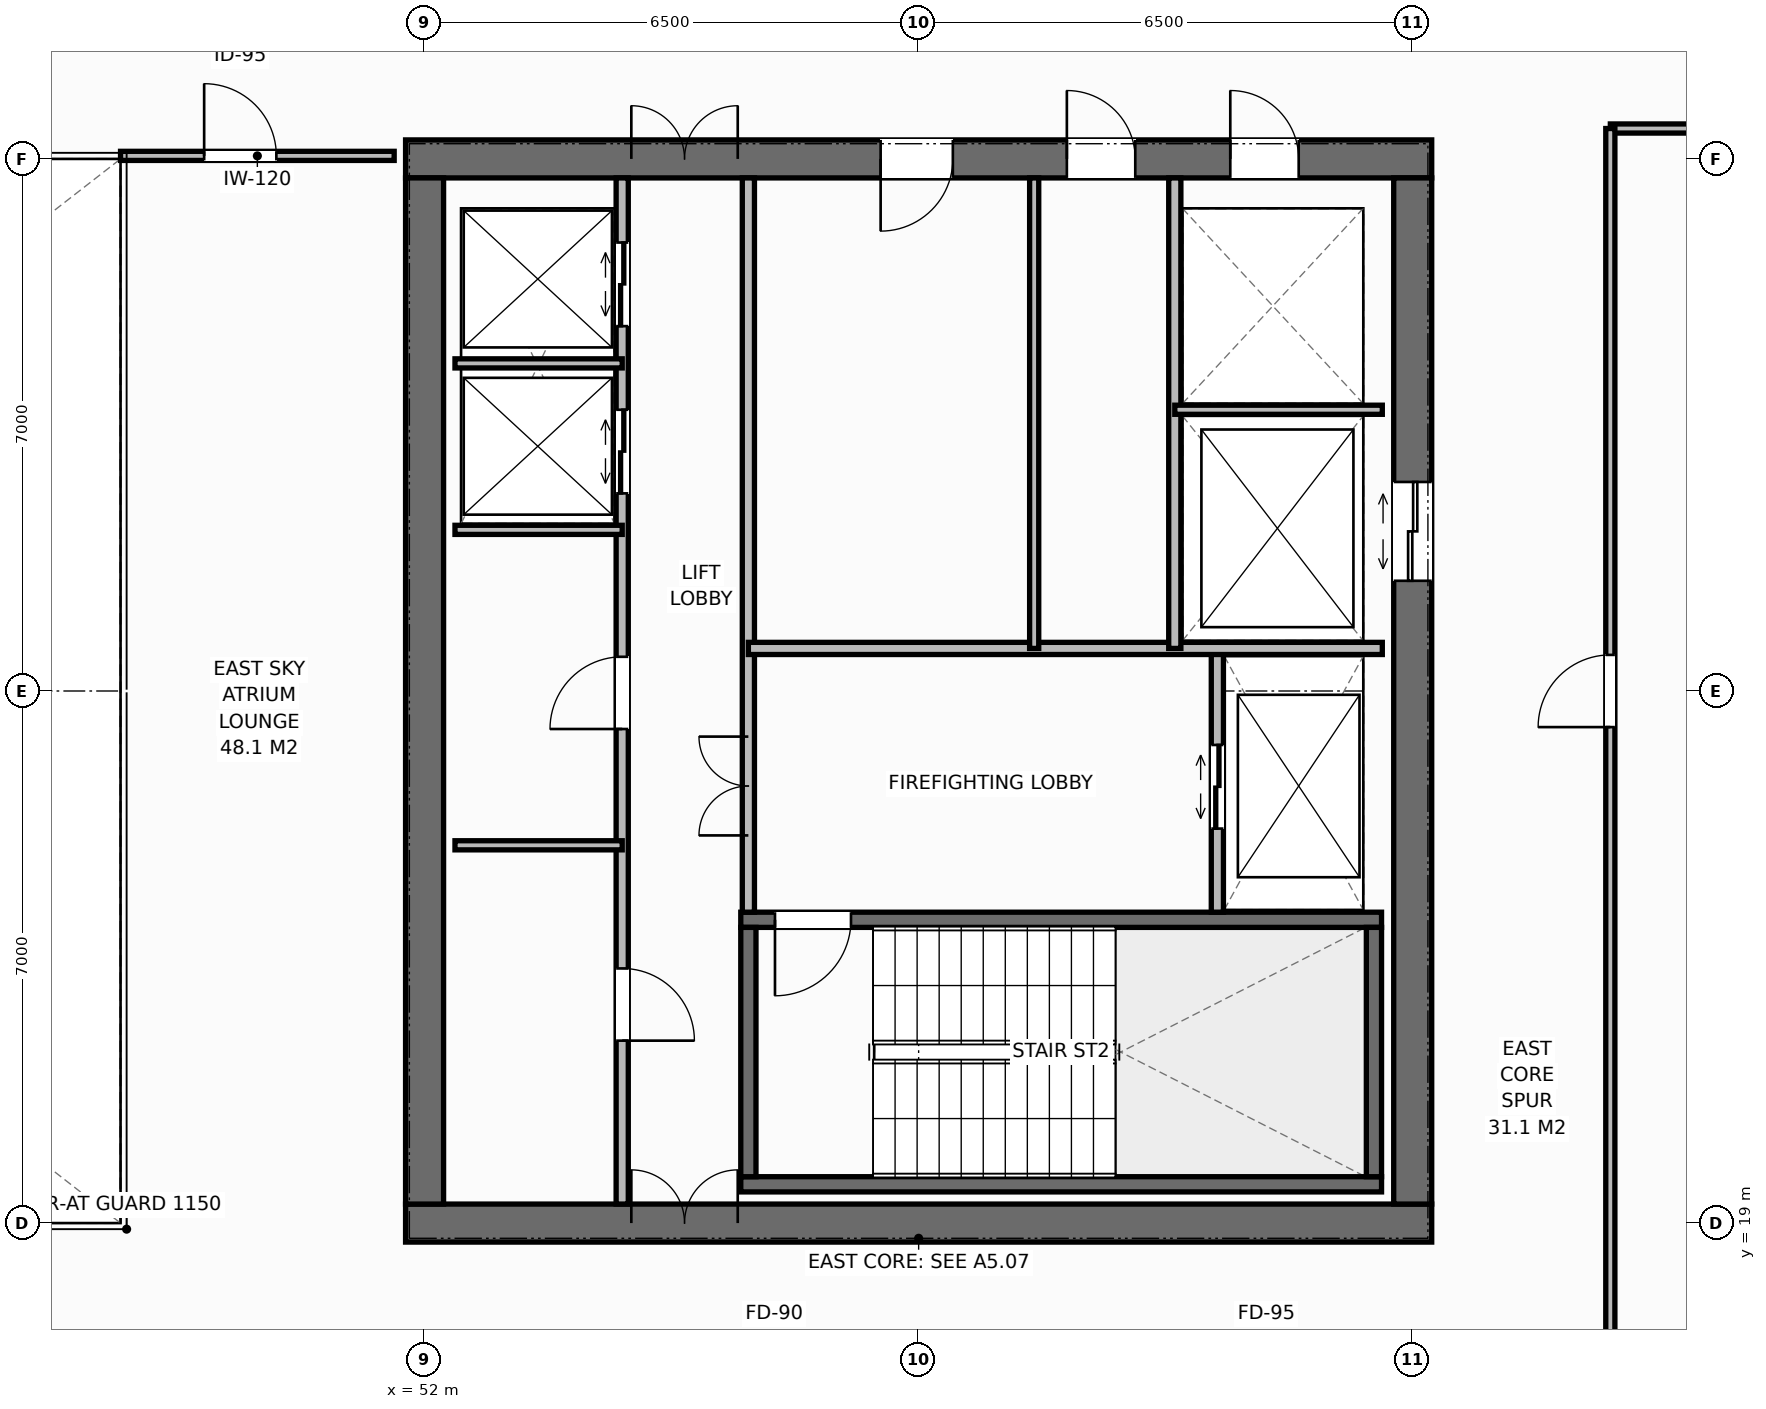
"""IFC4 building model, lengths in metres.
Left out: names, types, materials, properties, quantities, classifications, styles, units other than length and angle.
Written with IfcOpenShell. Run it as: python <this file> out.ifc"""

import sys

from ifc_helpers import new_model, si_unit, direction, frame, frame_2d, origin, place, context, subcontext, project, spatial, rectangle, extrude, element, fill, save


model = new_model("IFC4")
c1 = context("Model", 3, precision=1e-05, world=origin(), true_north=direction((0.0, 1.0)))
c2 = subcontext(c1, "Body", "Model", "MODEL_VIEW")
j1 = project(units=[si_unit("LENGTHUNIT", "METRE"), si_unit("PLANEANGLEUNIT", "RADIAN")], contexts=[c1])
p1 = place(None, origin())
s1 = spatial("IfcSite", under=j1, at=p1, CompositionType="ELEMENT")
p2 = place(p1, origin())
s2 = spatial("IfcBuilding", under=s1, at=p2, CompositionType="ELEMENT")
p3 = place(p2, frame((0.0, 0.0, 290.4)))
s3 = spatial("IfcBuildingStorey", under=s2, at=p3, CompositionType="ELEMENT", Elevation=290.4)
p4 = place(p3, frame((51.75, 19.0, 0.0), z_axis=(0.0, 0.0, 1.0), x_axis=(1.0, 0.0, 0.0)))
e1 = element("IfcWall", 1, at=p4, inside=s3, PredefinedType="SHEAR", context=c2, shape_type="SweptSolid", body=[
    extrude(rectangle(XDim=13.5, YDim=0.5, at=frame_2d((6.75, 0.0))), origin(), (0.0, 0.0, 1.0), 4.0),
])
p5 = place(p4, frame((2.97, 0.0, 0.0)))
e2 = element("IfcOpeningElement", 2, at=p5, cuts=e1, PredefinedType="OPENING", context=c2, shape_type="SweptSolid", body=[
    extrude(rectangle(XDim=1.4, YDim=2.2, at=frame_2d((0.7, 1.1))), frame((0.0, 0.26, 0.0), z_axis=(0.0, -1.0, 0.0), x_axis=(1.0, 0.0, 0.0)), (0.0, 0.0, 1.0), 0.52),
])
p6 = place(p3, frame((51.75, 33.0, 0.0), z_axis=(0.0, 0.0, 1.0), x_axis=(1.0, 0.0, 0.0)))
e3 = element("IfcWall", 3, at=p6, inside=s3, PredefinedType="SHEAR", context=c2, shape_type="SweptSolid", body=[
    extrude(rectangle(XDim=13.5, YDim=0.5, at=frame_2d((6.75, 0.0))), origin(), (0.0, 0.0, 1.0), 4.0),
])
p7 = place(p6, frame((2.97, 0.0, 0.0)))
e4 = element("IfcOpeningElement", 4, at=p7, cuts=e3, PredefinedType="OPENING", context=c2, shape_type="SweptSolid", body=[
    extrude(rectangle(XDim=1.4, YDim=2.2, at=frame_2d((0.7, 1.1))), frame((0.0, 0.26, 0.0), z_axis=(0.0, -1.0, 0.0), x_axis=(1.0, 0.0, 0.0)), (0.0, 0.0, 1.0), 0.52),
])
p8 = place(p6, frame((10.85, 0.0, 0.0)))
e5 = element("IfcOpeningElement", 5, at=p8, cuts=e3, PredefinedType="OPENING", context=c2, shape_type="SweptSolid", body=[
    extrude(rectangle(XDim=0.9, YDim=2.15, at=frame_2d((0.45, 1.075))), frame((0.0, 0.26, 0.0), z_axis=(0.0, -1.0, 0.0), x_axis=(1.0, 0.0, 0.0)), (0.0, 0.0, 1.0), 0.52),
])
p9 = place(p6, frame((6.25, 0.0, 0.0)))
e6 = element("IfcOpeningElement", 6, at=p9, cuts=e3, PredefinedType="OPENING", context=c2, shape_type="SweptSolid", body=[
    extrude(rectangle(XDim=0.95, YDim=2.15, at=frame_2d((0.475, 1.075))), frame((0.0, 0.26, 0.0), z_axis=(0.0, -1.0, 0.0), x_axis=(1.0, 0.0, 0.0)), (0.0, 0.0, 1.0), 0.52),
])
p10 = place(p6, frame((8.7, 0.0, 0.0)))
e7 = element("IfcOpeningElement", 7, at=p10, cuts=e3, PredefinedType="OPENING", context=c2, shape_type="SweptSolid", body=[
    extrude(rectangle(XDim=0.9, YDim=2.15, at=frame_2d((0.45, 1.075))), frame((0.0, 0.26, 0.0), z_axis=(0.0, -1.0, 0.0), x_axis=(1.0, 0.0, 0.0)), (0.0, 0.0, 1.0), 0.52),
])
p11 = place(p3, frame((52.0, 19.25, 0.0), z_axis=(0.0, 0.0, 1.0), x_axis=(0.0, 1.0, 0.0)))
e8 = element("IfcWall", 8, at=p11, inside=s3, PredefinedType="SHEAR", context=c2, shape_type="SweptSolid", body=[
    extrude(rectangle(XDim=13.5, YDim=0.5, at=frame_2d((6.75, 0.0))), origin(), (0.0, 0.0, 1.0), 4.0),
])
p12 = place(p3, frame((65.0, 19.25, 0.0), z_axis=(0.0, 0.0, 1.0), x_axis=(0.0, 1.0, 0.0)))
e9 = element("IfcWall", 9, at=p12, inside=s3, PredefinedType="SHEAR", context=c2, shape_type="SweptSolid", body=[
    extrude(rectangle(XDim=13.5, YDim=0.5, at=frame_2d((6.75, 0.0))), origin(), (0.0, 0.0, 1.0), 4.0),
])
p13 = place(p12, frame((8.2, 0.0, 0.0)))
e10 = element("IfcOpeningElement", 10, at=p13, cuts=e9, PredefinedType="OPENING", context=c2, shape_type="SweptSolid", body=[
    extrude(rectangle(XDim=1.3, YDim=2.2, at=frame_2d((0.65, 1.1))), frame((0.0, 0.26, 0.0), z_axis=(0.0, -1.0, 0.0), x_axis=(1.0, 0.0, 0.0)), (0.0, 0.0, 1.0), 0.52),
])
p14 = place(p3, frame((56.16, 19.51, 0.0), z_axis=(0.0, 0.0, 1.0), x_axis=(1.0, 0.0, 0.0)))
e11 = element("IfcWall", 11, at=p14, inside=s3, PredefinedType="SHEAR", context=c2, shape_type="SweptSolid", body=[
    extrude(rectangle(XDim=8.43, YDim=0.2, at=frame_2d((4.215, 0.0))), origin(), (0.0, 0.0, 1.0), 4.0),
])
p15 = place(p3, frame((56.16, 22.99, 0.0), z_axis=(0.0, 0.0, 1.0), x_axis=(1.0, 0.0, 0.0)))
e12 = element("IfcWall", 12, at=p15, inside=s3, PredefinedType="SHEAR", context=c2, shape_type="SweptSolid", body=[
    extrude(rectangle(XDim=8.43, YDim=0.2, at=frame_2d((4.215, 0.0))), origin(), (0.0, 0.0, 1.0), 4.0),
])
p16 = place(p15, frame((0.45, 0.0, 0.0)))
e13 = element("IfcOpeningElement", 13, at=p16, cuts=e12, PredefinedType="OPENING", context=c2, shape_type="SweptSolid", body=[
    extrude(rectangle(XDim=1.0, YDim=2.15, at=frame_2d((0.5, 1.075))), frame((0.0, 0.11, 0.0), z_axis=(0.0, -1.0, 0.0), x_axis=(1.0, 0.0, 0.0)), (0.0, 0.0, 1.0), 0.22),
])
for number, where, z_axis, x_axis in (
    (14, (56.26, 19.61, 0.0), (0.0, 0.0, 1.0), (0.0, 1.0, 0.0)),
    (15, (64.49, 19.61, 0.0), (0.0, 0.0, 1.0), (0.0, 1.0, 0.0)),
):
    element("IfcWall", number, at=place(p3, frame(where, z_axis=z_axis, x_axis=x_axis)), inside=s3, PredefinedType="SHEAR", context=c2, shape_type="SweptSolid", body=[
        extrude(rectangle(XDim=3.28, YDim=0.2, at=frame_2d((1.64, 0.0))), origin(), (0.0, 0.0, 1.0), 4.0),
    ])
p17 = place(p3, frame((54.6, 19.25, 0.0), z_axis=(0.0, 0.0, 1.0), x_axis=(0.0, 1.0, 0.0)))
e16 = element("IfcWall", 16, at=p17, inside=s3, PredefinedType="STANDARD", context=c2, shape_type="SweptSolid", body=[
    extrude(rectangle(XDim=13.5, YDim=0.16, at=frame_2d((6.75, 0.0))), origin(), (0.0, 0.0, 1.0), 3.788),
])
p18 = place(p17, frame((2.15, 0.0, 0.0)))
e17 = element("IfcOpeningElement", 17, at=p18, cuts=e16, PredefinedType="OPENING", context=c2, shape_type="SweptSolid", body=[
    extrude(rectangle(XDim=0.95, YDim=2.15, at=frame_2d((0.475, 1.075))), frame((0.0, 0.09, 0.0), z_axis=(0.0, -1.0, 0.0), x_axis=(1.0, 0.0, 0.0)), (0.0, 0.0, 1.0), 0.18),
])
p19 = place(p17, frame((6.25, 0.0, 0.0)))
e18 = element("IfcOpeningElement", 18, at=p19, cuts=e16, PredefinedType="OPENING", context=c2, shape_type="SweptSolid", body=[
    extrude(rectangle(XDim=0.95, YDim=2.15, at=frame_2d((0.475, 1.075))), frame((0.0, 0.09, 0.0), z_axis=(0.0, -1.0, 0.0), x_axis=(1.0, 0.0, 0.0)), (0.0, 0.0, 1.0), 0.18),
])
p20 = place(p17, frame((9.35, 0.0, 0.0)))
e19 = element("IfcOpeningElement", 19, at=p20, cuts=e16, PredefinedType="OPENING", context=c2, shape_type="SweptSolid", body=[
    extrude(rectangle(XDim=1.1, YDim=2.2, at=frame_2d((0.55, 1.1))), frame((0.0, 0.09, 0.0), z_axis=(0.0, -1.0, 0.0), x_axis=(1.0, 0.0, 0.0)), (0.0, 0.0, 1.0), 0.18),
])
p21 = place(p17, frame((11.55, 0.0, 0.0)))
e20 = element("IfcOpeningElement", 20, at=p21, cuts=e16, PredefinedType="OPENING", context=c2, shape_type="SweptSolid", body=[
    extrude(rectangle(XDim=1.1, YDim=2.2, at=frame_2d((0.55, 1.1))), frame((0.0, 0.09, 0.0), z_axis=(0.0, -1.0, 0.0), x_axis=(1.0, 0.0, 0.0)), (0.0, 0.0, 1.0), 0.18),
])
p22 = place(p3, frame((56.26, 23.09, 0.0), z_axis=(0.0, 0.0, 1.0), x_axis=(0.0, 1.0, 0.0)))
e21 = element("IfcWall", 21, at=p22, inside=s3, PredefinedType="STANDARD", context=c2, shape_type="SweptSolid", body=[
    extrude(rectangle(XDim=9.66, YDim=0.16, at=frame_2d((4.83, 0.0))), origin(), (0.0, 0.0, 1.0), 3.788),
])
p23 = place(p22, frame((1.01, 0.0, 0.0)))
e22 = element("IfcOpeningElement", 22, at=p23, cuts=e21, PredefinedType="OPENING", context=c2, shape_type="SweptSolid", body=[
    extrude(rectangle(XDim=1.3, YDim=2.2, at=frame_2d((0.65, 1.1))), frame((0.0, 0.09, 0.0), z_axis=(0.0, -1.0, 0.0), x_axis=(1.0, 0.0, 0.0)), (0.0, 0.0, 1.0), 0.18),
])
for number, where, z_axis, x_axis in (
    (23, (52.4, 23.97, 0.0), (0.0, 0.0, 1.0), (1.0, 0.0, 0.0)),
    (24, (52.4, 28.12, 0.0), (0.0, 0.0, 1.0), (1.0, 0.0, 0.0)),
    (25, (52.4, 30.31, 0.0), (0.0, 0.0, 1.0), (1.0, 0.0, 0.0)),
):
    element("IfcWall", number, at=place(p3, frame(where, z_axis=z_axis, x_axis=x_axis)), inside=s3, PredefinedType="PARTITIONING", context=c2, shape_type="SweptSolid", body=[
        extrude(rectangle(XDim=2.2, YDim=0.12, at=frame_2d((1.1, 0.0))), origin(), (0.0, 0.0, 1.0), 3.788),
    ])
p24 = place(p3, frame((62.43, 23.09, 0.0), z_axis=(0.0, 0.0, 1.0), x_axis=(0.0, 1.0, 0.0)))
e26 = element("IfcWall", 26, at=p24, inside=s3, PredefinedType="STANDARD", context=c2, shape_type="SweptSolid", body=[
    extrude(rectangle(XDim=3.47, YDim=0.16, at=frame_2d((1.735, 0.0))), origin(), (0.0, 0.0, 1.0), 3.788),
])
p25 = place(p24, frame((1.1, 0.0, 0.0)))
e27 = element("IfcOpeningElement", 27, at=p25, cuts=e26, PredefinedType="OPENING", context=c2, shape_type="SweptSolid", body=[
    extrude(rectangle(XDim=1.1, YDim=2.2, at=frame_2d((0.55, 1.1))), frame((0.0, 0.09, 0.0), z_axis=(0.0, -1.0, 0.0), x_axis=(1.0, 0.0, 0.0)), (0.0, 0.0, 1.0), 0.18),
])
p26 = place(p3, frame((56.26, 26.56, 0.0), z_axis=(0.0, 0.0, 1.0), x_axis=(1.0, 0.0, 0.0)))
e28 = element("IfcWall", 28, at=p26, inside=s3, PredefinedType="STANDARD", context=c2, shape_type="SweptSolid", body=[
    extrude(rectangle(XDim=8.34, YDim=0.16, at=frame_2d((4.17, 0.0))), origin(), (0.0, 0.0, 1.0), 3.788),
])
p27 = place(p3, frame((61.87, 26.56, 0.0), z_axis=(0.0, 0.0, 1.0), x_axis=(0.0, 1.0, 0.0)))
e29 = element("IfcWall", 29, at=p27, inside=s3, PredefinedType="STANDARD", context=c2, shape_type="SweptSolid", body=[
    extrude(rectangle(XDim=6.19, YDim=0.16, at=frame_2d((3.095, 0.0))), origin(), (0.0, 0.0, 1.0), 3.788),
])
p28 = place(p3, frame((61.87, 29.7, 0.0), z_axis=(0.0, 0.0, 1.0), x_axis=(1.0, 0.0, 0.0)))
e30 = element("IfcWall", 30, at=p28, inside=s3, PredefinedType="PARTITIONING", context=c2, shape_type="SweptSolid", body=[
    extrude(rectangle(XDim=2.73, YDim=0.12, at=frame_2d((1.365, 0.0))), origin(), (0.0, 0.0, 1.0), 3.788),
])
p29 = place(p3, frame((60.02, 26.56, 0.0), z_axis=(0.0, 0.0, 1.0), x_axis=(0.0, 1.0, 0.0)))
e31 = element("IfcWall", 31, at=p29, inside=s3, PredefinedType="PARTITIONING", context=c2, shape_type="SweptSolid", body=[
    extrude(rectangle(XDim=6.19, YDim=0.12, at=frame_2d((3.095, 0.0))), origin(), (0.0, 0.0, 1.0), 3.788),
])
p30 = place(p3, frame((48.0, 33.04, 0.0), z_axis=(0.0, 0.0, 1.0), x_axis=(1.0, 0.0, 0.0)))
e32 = element("IfcWall", 32, at=p30, inside=s3, PredefinedType="PARTITIONING", context=c2, shape_type="SweptSolid", body=[
    extrude(rectangle(XDim=3.6, YDim=0.12, at=frame_2d((1.8, 0.0))), origin(), (0.0, 0.0, 1.0), 3.528),
])
p31 = place(p30, frame((1.1, 0.0, 0.0)))
e33 = element("IfcOpeningElement", 33, at=p31, cuts=e32, PredefinedType="OPENING", context=c2, shape_type="SweptSolid", body=[
    extrude(rectangle(XDim=0.95, YDim=2.15, at=frame_2d((0.475, 1.075))), frame((0.0, 0.07, 0.0), z_axis=(0.0, -1.0, 0.0), x_axis=(1.0, 0.0, 0.0)), (0.0, 0.0, 1.0), 0.14),
])
p32 = place(p3, frame((67.6, 33.4, 0.0), z_axis=(0.0, 0.0, 1.0), x_axis=(1.0, 0.0, 0.0)))
e34 = element("IfcWall", 34, at=p32, inside=s3, PredefinedType="PARTITIONING", context=c2, shape_type="SweptSolid", body=[
    extrude(rectangle(XDim=5.767, YDim=0.12, at=frame_2d((2.884, 0.0))), origin(), (0.0, 0.0, 1.0), 3.788),
])
p33 = place(p3, frame((67.6, 16.5, 0.0), z_axis=(0.0, 0.0, 1.0), x_axis=(0.0, 1.0, 0.0)))
e35 = element("IfcWall", 35, at=p33, inside=s3, PredefinedType="PARTITIONING", context=c2, shape_type="SweptSolid", body=[
    extrude(rectangle(XDim=16.9, YDim=0.12, at=frame_2d((8.45, 0.0))), origin(), (0.0, 0.0, 1.0), 3.788),
])
p34 = place(p33, frame((9.025, 0.0, 0.0)))
e36 = element("IfcOpeningElement", 36, at=p34, cuts=e35, PredefinedType="OPENING", context=c2, shape_type="SweptSolid", body=[
    extrude(rectangle(XDim=0.95, YDim=2.15, at=frame_2d((0.475, 1.075))), frame((0.0, 0.07, 0.0), z_axis=(0.0, -1.0, 0.0), x_axis=(1.0, 0.0, 0.0)), (0.0, 0.0, 1.0), 0.14),
])
p35 = place(p5, origin())
e37 = element("IfcDoor", 37, at=p35, inside=s3, OperationType="DOUBLE_DOOR_SINGLE_SWING", PredefinedType="DOOR", context=c2, shape_type="SweptSolid", body=[
    extrude(rectangle(XDim=1.4, YDim=2.2, at=frame_2d((0.7, 1.1))), frame((0.0, 0.075, 0.0), z_axis=(0.0, -1.0, 0.0), x_axis=(1.0, 0.0, 0.0)), (0.0, 0.0, 1.0), 0.05),
])
fill(e2, e37)
p36 = place(p7, origin())
e38 = element("IfcDoor", 38, at=p36, inside=s3, OperationType="DOUBLE_DOOR_SINGLE_SWING", PredefinedType="DOOR", context=c2, shape_type="SweptSolid", body=[
    extrude(rectangle(XDim=1.4, YDim=2.2, at=frame_2d((0.7, 1.1))), frame((0.0, -0.025, 0.0), z_axis=(0.0, -1.0, 0.0), x_axis=(1.0, 0.0, 0.0)), (0.0, 0.0, 1.0), 0.05),
])
fill(e4, e38)
p37 = place(p18, origin())
e39 = element("IfcDoor", 39, at=p37, inside=s3, OperationType="SINGLE_SWING_RIGHT", PredefinedType="DOOR", context=c2, shape_type="SweptSolid", body=[
    extrude(rectangle(XDim=0.95, YDim=2.15, at=frame_2d((0.475, 1.075))), frame((0.0, 0.025, 0.0), z_axis=(0.0, -1.0, 0.0), x_axis=(1.0, 0.0, 0.0)), (0.0, 0.0, 1.0), 0.05),
])
fill(e17, e39)
p38 = place(p19, origin())
e40 = element("IfcDoor", 40, at=p38, inside=s3, OperationType="SINGLE_SWING_LEFT", PredefinedType="DOOR", context=c2, shape_type="SweptSolid", body=[
    extrude(rectangle(XDim=0.95, YDim=2.15, at=frame_2d((0.475, 1.075))), frame((0.0, 0.025, 0.0), z_axis=(0.0, -1.0, 0.0), x_axis=(1.0, 0.0, 0.0)), (0.0, 0.0, 1.0), 0.05),
])
fill(e18, e40)
p39 = place(p20, origin())
e41 = element("IfcDoor", 41, at=p39, inside=s3, OperationType="DOUBLE_DOOR_SLIDING", PredefinedType="DOOR", context=c2, shape_type="SweptSolid", body=[
    extrude(rectangle(XDim=1.1, YDim=2.2, at=frame_2d((0.55, 1.1))), frame((0.0, 0.025, 0.0), z_axis=(0.0, -1.0, 0.0), x_axis=(1.0, 0.0, 0.0)), (0.0, 0.0, 1.0), 0.05),
])
fill(e19, e41)
p40 = place(p21, origin())
e42 = element("IfcDoor", 42, at=p40, inside=s3, OperationType="DOUBLE_DOOR_SLIDING", PredefinedType="DOOR", context=c2, shape_type="SweptSolid", body=[
    extrude(rectangle(XDim=1.1, YDim=2.2, at=frame_2d((0.55, 1.1))), frame((0.0, 0.025, 0.0), z_axis=(0.0, -1.0, 0.0), x_axis=(1.0, 0.0, 0.0)), (0.0, 0.0, 1.0), 0.05),
])
fill(e20, e42)
p41 = place(p16, origin())
e43 = element("IfcDoor", 43, at=p41, inside=s3, OperationType="SINGLE_SWING_RIGHT", PredefinedType="DOOR", context=c2, shape_type="SweptSolid", body=[
    extrude(rectangle(XDim=1.0, YDim=2.15, at=frame_2d((0.5, 1.075))), frame((0.0, 0.025, 0.0), z_axis=(0.0, -1.0, 0.0), x_axis=(1.0, 0.0, 0.0)), (0.0, 0.0, 1.0), 0.05),
])
fill(e13, e43)
p42 = place(p25, origin())
e44 = element("IfcDoor", 44, at=p42, inside=s3, OperationType="DOUBLE_DOOR_SLIDING", PredefinedType="DOOR", context=c2, shape_type="SweptSolid", body=[
    extrude(rectangle(XDim=1.1, YDim=2.2, at=frame_2d((0.55, 1.1))), frame((0.0, 0.025, 0.0), z_axis=(0.0, -1.0, 0.0), x_axis=(1.0, 0.0, 0.0)), (0.0, 0.0, 1.0), 0.05),
])
fill(e27, e44)
p43 = place(p23, origin())
e45 = element("IfcDoor", 45, at=p43, inside=s3, OperationType="DOUBLE_DOOR_SINGLE_SWING", PredefinedType="DOOR", context=c2, shape_type="SweptSolid", body=[
    extrude(rectangle(XDim=1.3, YDim=2.2, at=frame_2d((0.65, 1.1))), frame((0.0, 0.025, 0.0), z_axis=(0.0, -1.0, 0.0), x_axis=(1.0, 0.0, 0.0)), (0.0, 0.0, 1.0), 0.05),
])
fill(e22, e45)
p44 = place(p13, origin())
e46 = element("IfcDoor", 46, at=p44, inside=s3, OperationType="DOUBLE_DOOR_SLIDING", PredefinedType="DOOR", context=c2, shape_type="SweptSolid", body=[
    extrude(rectangle(XDim=1.3, YDim=2.2, at=frame_2d((0.65, 1.1))), frame((0.0, 0.025, 0.0), z_axis=(0.0, -1.0, 0.0), x_axis=(1.0, 0.0, 0.0)), (0.0, 0.0, 1.0), 0.05),
])
fill(e10, e46)
p45 = place(p8, origin())
e47 = element("IfcDoor", 47, at=p45, inside=s3, OperationType="SINGLE_SWING_LEFT", PredefinedType="DOOR", context=c2, shape_type="SweptSolid", body=[
    extrude(rectangle(XDim=0.9, YDim=2.15, at=frame_2d((0.45, 1.075))), frame((0.0, -0.025, 0.0), z_axis=(0.0, -1.0, 0.0), x_axis=(1.0, 0.0, 0.0)), (0.0, 0.0, 1.0), 0.05),
])
fill(e5, e47)
p46 = place(p9, origin())
e48 = element("IfcDoor", 48, at=p46, inside=s3, OperationType="SINGLE_SWING_RIGHT", PredefinedType="DOOR", context=c2, shape_type="SweptSolid", body=[
    extrude(rectangle(XDim=0.95, YDim=2.15, at=frame_2d((0.475, 1.075))), frame((0.0, -0.025, 0.0), z_axis=(0.0, -1.0, 0.0), x_axis=(1.0, 0.0, 0.0)), (0.0, 0.0, 1.0), 0.05),
])
fill(e6, e48)
p47 = place(p10, origin())
e49 = element("IfcDoor", 49, at=p47, inside=s3, OperationType="SINGLE_SWING_LEFT", PredefinedType="DOOR", context=c2, shape_type="SweptSolid", body=[
    extrude(rectangle(XDim=0.9, YDim=2.15, at=frame_2d((0.45, 1.075))), frame((0.0, -0.025, 0.0), z_axis=(0.0, -1.0, 0.0), x_axis=(1.0, 0.0, 0.0)), (0.0, 0.0, 1.0), 0.05),
])
fill(e7, e49)
p48 = place(p31, origin())
e50 = element("IfcDoor", 50, at=p48, inside=s3, OperationType="SINGLE_SWING_LEFT", PredefinedType="DOOR", context=c2, shape_type="SweptSolid", body=[
    extrude(rectangle(XDim=0.95, YDim=2.15, at=frame_2d((0.475, 1.075))), frame((0.0, 0.025, 0.0), z_axis=(0.0, -1.0, 0.0), x_axis=(1.0, 0.0, 0.0)), (0.0, 0.0, 1.0), 0.05),
])
fill(e33, e50)
p49 = place(p34, origin())
e51 = element("IfcDoor", 51, at=p49, inside=s3, OperationType="SINGLE_SWING_LEFT", PredefinedType="DOOR", context=c2, shape_type="SweptSolid", body=[
    extrude(rectangle(XDim=0.95, YDim=2.15, at=frame_2d((0.475, 1.075))), frame((0.0, 0.025, 0.0), z_axis=(0.0, -1.0, 0.0), x_axis=(1.0, 0.0, 0.0)), (0.0, 0.0, 1.0), 0.05),
])
fill(e36, e51)
save(model, sys.argv[1])
